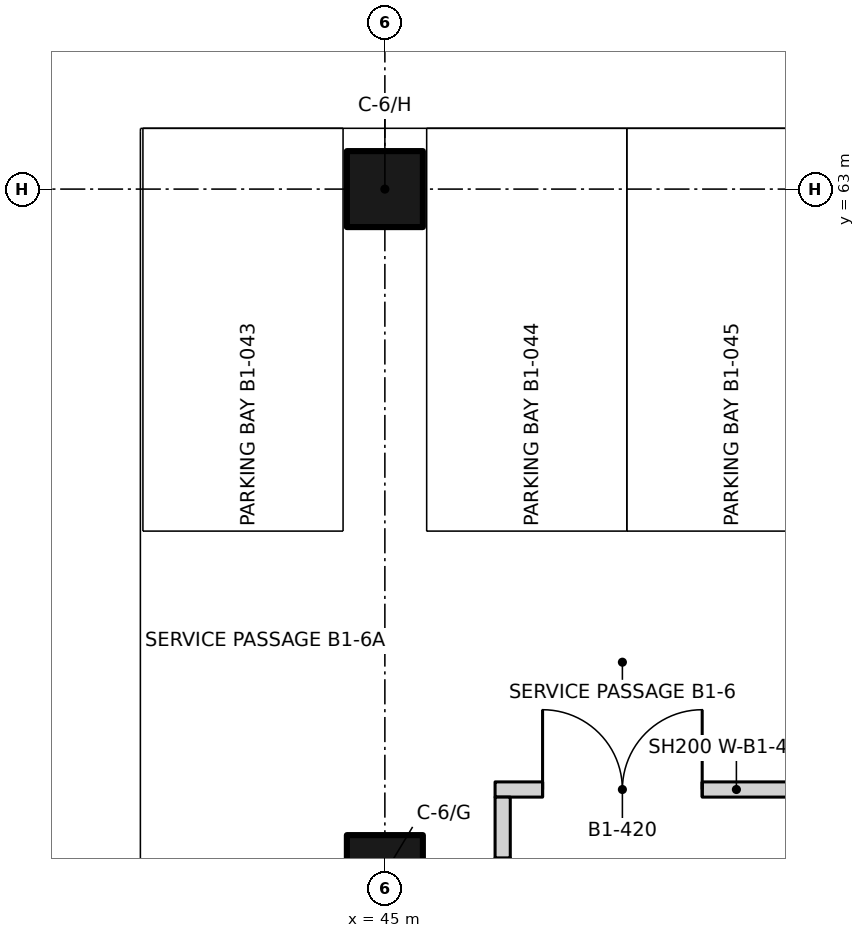
"""IFC4 building model, lengths in metres.
Left out: names, types, materials, properties, quantities, classifications, styles, units other than length and angle.
Written with IfcOpenShell. Run it as: python <this file> out.ifc"""

import sys

from ifc_helpers import new_model, si_unit, direction, frame, frame_2d, origin, origin_2d, place, context, subcontext, project, spatial, rectangle, extrude, element, fill, save


model = new_model("IFC4")
c1 = context("Model", 3, precision=1e-05, world=origin(), true_north=direction((0.0, 1.0)))
c2 = subcontext(c1, "Body", "Model", "MODEL_VIEW")
j1 = project(units=[si_unit("LENGTHUNIT", "METRE"), si_unit("PLANEANGLEUNIT", "RADIAN")], contexts=[c1])
p1 = place(None, origin())
s1 = spatial("IfcSite", under=j1, at=p1, CompositionType="ELEMENT")
p2 = place(p1, origin())
s2 = spatial("IfcBuilding", under=s1, at=p2, CompositionType="ELEMENT")
p3 = place(p2, frame((0.0, 0.0, -5.1)))
s3 = spatial("IfcBuildingStorey", under=s2, at=p3, CompositionType="ELEMENT", Elevation=-5.1)
for number, where, z_axis, x_axis in (
    (1, (45.0, 54.0, 0.0), (0.0, 0.0, 1.0), (1.0, 0.0, 0.0)),
    (2, (45.0, 63.0, 0.0), (0.0, 0.0, 1.0), (1.0, 0.0, 0.0)),
):
    element("IfcColumn", number, at=place(p3, frame(where, z_axis=z_axis, x_axis=x_axis)), inside=s3, PredefinedType="COLUMN", context=c2, shape_type="SweptSolid", body=[
        extrude(rectangle(XDim=1.0, YDim=1.0, at=origin_2d()), origin(), (0.0, 0.0, 1.0), 5.1),
    ])
p4 = place(p3, frame((46.45, 55.1, 0.0), z_axis=(0.0, 0.0, 1.0), x_axis=(1.0, 0.0, 0.0)))
e3 = element("IfcWall", 3, at=p4, inside=s3, PredefinedType="PARTITIONING", context=c2, shape_type="SweptSolid", body=[
    extrude(rectangle(XDim=6.35, YDim=0.2, at=frame_2d((3.175, 0.0))), origin(), (0.0, 0.0, 1.0), 4.75),
])
p5 = place(p4, frame((0.625, 0.0, 0.0)))
e4 = element("IfcOpeningElement", 4, at=p5, cuts=e3, PredefinedType="OPENING", context=c2, shape_type="SweptSolid", body=[
    extrude(rectangle(XDim=2.1, YDim=2.4, at=frame_2d((1.05, 1.2))), frame((0.0, 0.11, 0.0), z_axis=(0.0, -1.0, 0.0), x_axis=(1.0, 0.0, 0.0)), (0.0, 0.0, 1.0), 0.22),
])
p6 = place(p3, frame((46.55, 54.2, 0.0), z_axis=(0.0, 0.0, 1.0), x_axis=(0.0, 1.0, 0.0)))
e5 = element("IfcWall", 5, at=p6, inside=s3, PredefinedType="PARTITIONING", context=c2, shape_type="SweptSolid", body=[
    extrude(rectangle(XDim=0.8, YDim=0.2, at=frame_2d((0.4, 0.0))), origin(), (0.0, 0.0, 1.0), 4.75),
])
p7 = place(p5, origin())
e6 = element("IfcDoor", 6, at=p7, inside=s3, OperationType="DOUBLE_DOOR_SINGLE_SWING", PredefinedType="DOOR", context=c2, shape_type="SweptSolid", body=[
    extrude(rectangle(XDim=2.1, YDim=2.4, at=frame_2d((1.05, 1.2))), frame((0.0, 0.025, 0.0), z_axis=(0.0, -1.0, 0.0), x_axis=(1.0, 0.0, 0.0)), (0.0, 0.0, 1.0), 0.05),
])
fill(e4, e6)
save(model, sys.argv[1])
